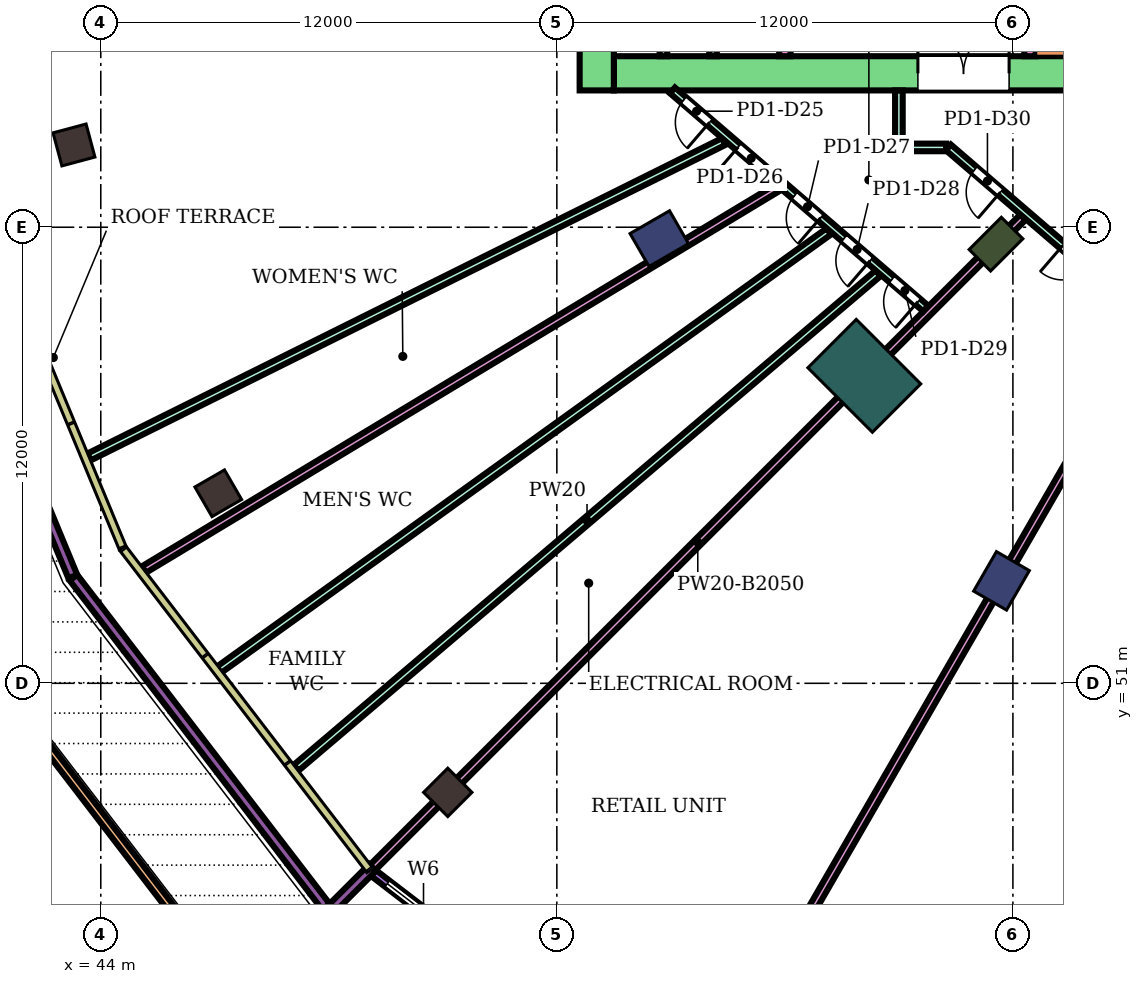
"""IFC4 building model, lengths in metres.
Left out: names, types, materials, properties, quantities, classifications, styles, units other than length and angle.
Written with IfcOpenShell. Run it as: python <this file> out.ifc"""

import sys

from ifc_helpers import new_model, si_unit, direction, frame, frame_2d, origin, origin_2d, place, context, subcontext, project, spatial, rectangle, extrude, element, fill, save


model = new_model("IFC4")
c1 = context("Model", 3, precision=1e-05, world=origin(), true_north=direction((0.0, 1.0)))
c2 = subcontext(c1, "Body", "Model", "MODEL_VIEW")
j1 = project(units=[si_unit("LENGTHUNIT", "METRE"), si_unit("PLANEANGLEUNIT", "RADIAN")], contexts=[c1])
p1 = place(None, origin())
s1 = spatial("IfcSite", under=j1, at=p1, CompositionType="ELEMENT")
p2 = place(p1, origin())
s2 = spatial("IfcBuilding", under=s1, at=p2, CompositionType="ELEMENT")
p3 = place(p2, frame((0.0, 0.0, 7.0)))
s3 = spatial("IfcBuildingStorey", under=s2, at=p3, CompositionType="ELEMENT", Elevation=7.0)
for number, where, z_axis, x_axis in (
    (1, (43.295, 65.165, 0.0), (0.0, 0.0, 1.0), (-0.966, -0.259, 0.0)),
    (2, (47.091, 56.0, 0.0), (0.0, 0.0, 1.0), (-0.866, -0.5, 0.0)),
    (3, (53.13, 48.13, 0.0), (0.0, 0.0, 1.0), (-0.707, -0.707, 0.0)),
):
    element("IfcColumn", number, at=place(p3, frame(where, z_axis=z_axis, x_axis=x_axis)), inside=s3, PredefinedType="COLUMN", context=c2, shape_type="SweptSolid", body=[
        extrude(rectangle(XDim=0.9, YDim=0.9, at=origin_2d()), origin(), (0.0, 0.0, 1.0), 5.4),
    ])
for number, where, z_axis, x_axis in (
    (4, (58.696, 62.7, 0.0), (0.0, 0.0, 1.0), (-0.866, -0.5, 0.0)),
    (5, (67.7, 53.696, 0.0), (0.0, 0.0, 1.0), (-0.5, -0.866, 0.0)),
):
    element("IfcColumn", number, at=place(p3, frame(where, z_axis=z_axis, x_axis=x_axis)), inside=s3, PredefinedType="COLUMN", context=c2, shape_type="SweptSolid", body=[
        extrude(rectangle(XDim=1.2, YDim=1.0, at=origin_2d()), origin(), (0.0, 0.0, 1.0), 5.4),
    ])
p4 = place(p3, frame((67.555, 62.555, 0.0), z_axis=(0.0, 0.0, 1.0), x_axis=(-0.707106781187, -0.707106781187, 0.0)))
e6 = element("IfcColumn", 6, at=p4, inside=s3, PredefinedType="COLUMN", context=c2, shape_type="SweptSolid", body=[
    extrude(rectangle(XDim=1.2, YDim=0.8, at=origin_2d()), origin(), (0.0, 0.0, 1.0), 5.4),
])
p5 = place(p3, frame((64.09, 59.09, 0.0), z_axis=(0.0, 0.0, 1.0), x_axis=(-0.707106781187, -0.707106781187, 0.0)))
e7 = element("IfcColumn", 7, at=p5, inside=s3, PredefinedType="COLUMN", context=c2, shape_type="SweptSolid", body=[
    extrude(rectangle(XDim=1.8, YDim=2.4, at=origin_2d()), origin(), (0.0, 0.0, 1.0), 5.4),
])
p6 = place(p3, frame((72.1, 67.05, 0.0), z_axis=(0.0, 0.0, 1.0), x_axis=(-1.0, 0.0, 0.0)))
e8 = element("IfcWall", 8, at=p6, inside=s3, PredefinedType="SHEAR", context=c2, shape_type="SweptSolid", body=[
    extrude(rectangle(XDim=14.6, YDim=0.9, at=frame_2d((7.3, 0.0))), origin(), (0.0, 0.0, 1.0), 4.95),
])
p7 = place(p6, frame((4.2, 0.0, 0.0)))
e9 = element("IfcOpeningElement", 9, at=p7, cuts=e8, PredefinedType="OPENING", context=c2, shape_type="SweptSolid", body=[
    extrude(rectangle(XDim=2.4, YDim=2.4, at=frame_2d((1.2, 1.2))), frame((0.0, 0.46, 0.0), z_axis=(0.0, -1.0, 0.0), x_axis=(1.0, 0.0, 0.0)), (0.0, 0.0, 1.0), 0.92),
])
p8 = place(p3, frame((57.05, 83.4, 0.0), z_axis=(0.0, 0.0, 1.0), x_axis=(0.0, -1.0, 0.0)))
e10 = element("IfcWall", 10, at=p8, inside=s3, PredefinedType="SHEAR", context=c2, shape_type="SweptSolid", body=[
    extrude(rectangle(XDim=16.8, YDim=0.9, at=frame_2d((8.4, 0.0))), origin(), (0.0, 0.0, 1.0), 4.95),
])
p9 = place(p3, frame((68.45, 75.0, 0.0), z_axis=(0.0, 0.0, 1.0), x_axis=(0.0, -1.0, 0.0)))
e11 = element("IfcWall", 11, at=p9, inside=s3, PredefinedType="SHEAR", context=c2, shape_type="SweptSolid", body=[
    extrude(rectangle(XDim=7.5, YDim=0.3, at=frame_2d((3.75, 0.0))), origin(), (0.0, 0.0, 1.0), 4.95),
])
p10 = place(p9, frame((1.85, 0.0, 0.0)))
e12 = element("IfcOpeningElement", 12, at=p10, cuts=e11, PredefinedType="OPENING", context=c2, shape_type="SweptSolid", body=[
    extrude(rectangle(XDim=0.9, YDim=2.1, at=frame_2d((0.45, 1.05))), frame((0.0, 0.16, 0.0), z_axis=(0.0, -1.0, 0.0), x_axis=(1.0, 0.0, 0.0)), (0.0, 0.0, 1.0), 0.32),
])
p11 = place(p3, frame((62.0, 71.4, 0.0), z_axis=(0.0, 0.0, 1.0), x_axis=(0.0, -1.0, 0.0)))
e13 = element("IfcWall", 13, at=p11, inside=s3, PredefinedType="SHEAR", context=c2, shape_type="SweptSolid", body=[
    extrude(rectangle(XDim=3.9, YDim=0.3, at=frame_2d((1.95, 0.0))), origin(), (0.0, 0.0, 1.0), 4.95),
])
p12 = place(p3, frame((51.08, 46.08, 0.0), z_axis=(0.0, 0.0, 1.0), x_axis=(0.793366340284, -0.608744486714, 0.0)))
e14 = element("IfcWall", 14, at=p12, inside=s3, PredefinedType="NOTDEFINED", context=c2, shape_type="SweptSolid", body=[
    extrude(rectangle(XDim=10.677, YDim=0.2, at=frame_2d((5.338, 0.0))), origin(), (0.0, 0.0, 1.0), 5.4),
])
p13 = place(p12, frame((0.58, 0.0, 0.9)))
e15 = element("IfcOpeningElement", 15, at=p13, cuts=e14, PredefinedType="OPENING", context=c2, shape_type="SweptSolid", body=[
    extrude(rectangle(XDim=2.4, YDim=2.4, at=frame_2d((1.2, 1.2))), frame((0.0, 0.11, 0.0), z_axis=(0.0, -1.0, 0.0), x_axis=(1.0, 0.0, 0.0)), (0.0, 0.0, 1.0), 0.22),
])
p14 = place(p12, frame((4.438, 0.0, 0.0)))
e16 = element("IfcOpeningElement", 16, at=p14, cuts=e14, PredefinedType="OPENING", context=c2, shape_type="SweptSolid", body=[
    extrude(rectangle(XDim=1.8, YDim=2.4, at=frame_2d((0.9, 1.2))), frame((0.0, 0.11, 0.0), z_axis=(0.0, -1.0, 0.0), x_axis=(1.0, 0.0, 0.0)), (0.0, 0.0, 1.0), 0.22),
])
p15 = place(p12, frame((7.697, 0.0, 0.9)))
e17 = element("IfcOpeningElement", 17, at=p15, cuts=e14, PredefinedType="OPENING", context=c2, shape_type="SweptSolid", body=[
    extrude(rectangle(XDim=2.4, YDim=2.4, at=frame_2d((1.2, 1.2))), frame((0.0, 0.11, 0.0), z_axis=(0.0, -1.0, 0.0), x_axis=(1.0, 0.0, 0.0)), (0.0, 0.0, 1.0), 0.22),
])
p16 = place(p3, frame((47.679, 42.698, 0.0), z_axis=(0.0, 0.0, 1.0), x_axis=(-0.608758745152, 0.79335539968, 0.0)))
e18 = element("IfcWall", 18, at=p16, inside=s3, PredefinedType="PARAPET", context=c2, shape_type="SweptSolid", body=[
    extrude(rectangle(XDim=11.903, YDim=0.2, at=frame_2d((5.952, 0.0))), origin(), (0.0, 0.0, 1.0), 1.1),
])
p17 = place(p3, frame((51.151, 46.151, 0.0), z_axis=(0.0, 0.0, 1.0), x_axis=(-0.707106781187, -0.707106781187, 0.0)))
e19 = element("IfcWall", 19, at=p17, inside=s3, PredefinedType="USERDEFINED", context=c2, shape_type="SweptSolid", body=[
    extrude(rectangle(XDim=1.471, YDim=0.25, at=frame_2d((0.736, 0.0))), origin(), (0.0, 0.0, 1.0), 0.6),
])
p18 = place(p3, frame((49.923, 45.123, 0.0), z_axis=(0.0, 0.0, 1.0), x_axis=(-0.608762138024, 0.793352796244, 0.0)))
e20 = element("IfcWall", 20, at=p18, inside=s3, PredefinedType="USERDEFINED", context=c2, shape_type="SweptSolid", body=[
    extrude(rectangle(XDim=10.913, YDim=0.25, at=frame_2d((5.457, 0.0))), origin(), (0.0, 0.0, 1.0), 0.6),
])
p19 = place(p3, frame((43.264, 53.809, 0.0), z_axis=(0.0, 0.0, 1.0), x_axis=(-0.382683446042, 0.923879526846, 0.0)))
e21 = element("IfcWall", 21, at=p19, inside=s3, PredefinedType="USERDEFINED", context=c2, shape_type="SweptSolid", body=[
    extrude(rectangle(XDim=4.919, YDim=0.25, at=frame_2d((2.46, 0.0))), origin(), (0.0, 0.0, 1.0), 0.6),
])
p20 = place(p3, frame((43.693, 56.956, 0.0), z_axis=(0.0, 0.0, 1.0), x_axis=(0.895500820316, 0.445059862056, 0.0)))
e22 = element("IfcWall", 22, at=p20, inside=s3, PredefinedType="PARTITIONING", context=c2, shape_type="SweptSolid", body=[
    extrude(rectangle(XDim=18.647, YDim=0.2, at=frame_2d((9.323, 0.0))), origin(), (0.0, 0.0, 1.0), 4.95),
])
p21 = place(p3, frame((45.134, 53.993, 0.0), z_axis=(0.0, 0.0, 1.0), x_axis=(0.856552604293, 0.516059721427, 0.0)))
e23 = element("IfcWall", 23, at=p21, inside=s3, PredefinedType="PARTITIONING", context=c2, shape_type="SweptSolid", body=[
    extrude(rectangle(XDim=19.479, YDim=0.2, at=frame_2d((9.74, 0.0))), origin(), (0.0, 0.0, 1.0), 3.35),
])
p22 = place(p3, frame((47.092, 51.343, 0.0), z_axis=(0.0, 0.0, 1.0), x_axis=(0.811971325551, 0.583697324375, 0.0)))
e24 = element("IfcWall", 24, at=p22, inside=s3, PredefinedType="PARTITIONING", context=c2, shape_type="SweptSolid", body=[
    extrude(rectangle(XDim=19.785, YDim=0.2, at=frame_2d((9.893, 0.0))), origin(), (0.0, 0.0, 1.0), 4.95),
])
p23 = place(p3, frame((49.138, 48.776, 0.0), z_axis=(0.0, 0.0, 1.0), x_axis=(0.762040332495, 0.647529560445, 0.0)))
e25 = element("IfcWall", 25, at=p23, inside=s3, PredefinedType="PARTITIONING", context=c2, shape_type="SweptSolid", body=[
    extrude(rectangle(XDim=20.094, YDim=0.2, at=frame_2d((10.047, 0.0))), origin(), (0.0, 0.0, 1.0), 4.95),
])
p24 = place(p3, frame((51.152, 46.152, 0.0), z_axis=(0.0, 0.0, 1.0), x_axis=(0.707101737431, 0.707111824906, 0.0)))
e26 = element("IfcWall", 26, at=p24, inside=s3, PredefinedType="PARTITIONING", context=c2, shape_type="SweptSolid", body=[
    extrude(rectangle(XDim=24.202, YDim=0.2, at=frame_2d((12.101, 0.0))), origin(), (0.0, 0.0, 1.0), 3.35),
])
p25 = place(p3, frame((59.042, 66.601, 0.0), z_axis=(0.0, 0.0, 1.0), x_axis=(0.757804642565, -0.652481512157, 0.0)))
e27 = element("IfcWall", 27, at=p25, inside=s3, PredefinedType="PARTITIONING", context=c2, shape_type="SweptSolid", body=[
    extrude(rectangle(XDim=8.794, YDim=0.2, at=frame_2d((4.397, 0.0))), origin(), (0.0, 0.0, 1.0), 4.95),
])
p26 = place(p25, frame((0.389, 0.0, 0.0)))
e28 = element("IfcOpeningElement", 28, at=p26, cuts=e27, PredefinedType="OPENING", context=c2, shape_type="SweptSolid", body=[
    extrude(rectangle(XDim=0.9, YDim=2.1, at=frame_2d((0.45, 1.05))), frame((0.0, 0.11, 0.0), z_axis=(0.0, -1.0, 0.0), x_axis=(1.0, 0.0, 0.0)), (0.0, 0.0, 1.0), 0.22),
])
p27 = place(p25, frame((2.285, 0.0, 0.0)))
e29 = element("IfcOpeningElement", 29, at=p27, cuts=e27, PredefinedType="OPENING", context=c2, shape_type="SweptSolid", body=[
    extrude(rectangle(XDim=0.9, YDim=2.1, at=frame_2d((0.45, 1.05))), frame((0.0, 0.11, 0.0), z_axis=(0.0, -1.0, 0.0), x_axis=(1.0, 0.0, 0.0)), (0.0, 0.0, 1.0), 0.22),
])
p28 = place(p25, frame((4.24, 0.0, 0.0)))
e30 = element("IfcOpeningElement", 30, at=p28, cuts=e27, PredefinedType="OPENING", context=c2, shape_type="SweptSolid", body=[
    extrude(rectangle(XDim=0.9, YDim=2.1, at=frame_2d((0.45, 1.05))), frame((0.0, 0.11, 0.0), z_axis=(0.0, -1.0, 0.0), x_axis=(1.0, 0.0, 0.0)), (0.0, 0.0, 1.0), 0.22),
])
p29 = place(p25, frame((5.963, 0.0, 0.0)))
e31 = element("IfcOpeningElement", 31, at=p29, cuts=e27, PredefinedType="OPENING", context=c2, shape_type="SweptSolid", body=[
    extrude(rectangle(XDim=0.9, YDim=2.1, at=frame_2d((0.45, 1.05))), frame((0.0, 0.11, 0.0), z_axis=(0.0, -1.0, 0.0), x_axis=(1.0, 0.0, 0.0)), (0.0, 0.0, 1.0), 0.22),
])
p30 = place(p25, frame((7.622, 0.0, 0.0)))
e32 = element("IfcOpeningElement", 32, at=p30, cuts=e27, PredefinedType="OPENING", context=c2, shape_type="SweptSolid", body=[
    extrude(rectangle(XDim=0.9, YDim=2.1, at=frame_2d((0.45, 1.05))), frame((0.0, 0.11, 0.0), z_axis=(0.0, -1.0, 0.0), x_axis=(1.0, 0.0, 0.0)), (0.0, 0.0, 1.0), 0.22),
])
p31 = place(p3, frame((59.6, 39.669, 0.0), z_axis=(0.0, 0.0, 1.0), x_axis=(0.500039717933, 0.866002471411, 0.0)))
e33 = element("IfcWall", 33, at=p31, inside=s3, PredefinedType="PARTITIONING", context=c2, shape_type="SweptSolid", body=[
    extrude(rectangle(XDim=23.958, YDim=0.2, at=frame_2d((11.979, 0.0))), origin(), (0.0, 0.0, 1.0), 3.35),
])
p32 = place(p3, frame((65.0, 65.2, 0.0), z_axis=(0.0, 0.0, 1.0), x_axis=(0.0, 1.0, 0.0)))
e34 = element("IfcWall", 34, at=p32, inside=s3, PredefinedType="PARTITIONING", context=c2, shape_type="SweptSolid", body=[
    extrude(rectangle(XDim=1.399, YDim=0.2, at=frame_2d((0.7, 0.0))), origin(), (0.0, 0.0, 1.0), 4.95),
])
p33 = place(p3, frame((65.0, 65.1, 0.0), z_axis=(0.0, 0.0, 1.0), x_axis=(1.0, 0.0, 0.0)))
e35 = element("IfcWall", 35, at=p33, inside=s3, PredefinedType="PARTITIONING", context=c2, shape_type="SweptSolid", body=[
    extrude(rectangle(XDim=1.242, YDim=0.2, at=frame_2d((0.621, 0.0))), origin(), (0.0, 0.0, 1.0), 4.95),
])
p34 = place(p3, frame((66.302, 65.1, 0.0), z_axis=(0.0, 0.0, 1.0), x_axis=(0.757895579626, -0.652375881209, 0.0)))
e36 = element("IfcWall", 36, at=p34, inside=s3, PredefinedType="PARTITIONING", context=c2, shape_type="SweptSolid", body=[
    extrude(rectangle(XDim=7.062, YDim=0.2, at=frame_2d((3.531, 0.0))), origin(), (0.0, 0.0, 1.0), 4.95),
])
p35 = place(p34, frame((3.964, 0.0, 0.0)))
e37 = element("IfcOpeningElement", 37, at=p35, cuts=e36, PredefinedType="OPENING", context=c2, shape_type="SweptSolid", body=[
    extrude(rectangle(XDim=1.8, YDim=2.1, at=frame_2d((0.9, 1.05))), frame((0.0, 0.11, 0.0), z_axis=(0.0, -1.0, 0.0), x_axis=(1.0, 0.0, 0.0)), (0.0, 0.0, 1.0), 0.22),
])
p36 = place(p34, frame((0.906, 0.0, 0.0)))
e38 = element("IfcOpeningElement", 38, at=p36, cuts=e36, PredefinedType="OPENING", context=c2, shape_type="SweptSolid", body=[
    extrude(rectangle(XDim=0.9, YDim=2.1, at=frame_2d((0.45, 1.05))), frame((0.0, 0.11, 0.0), z_axis=(0.0, -1.0, 0.0), x_axis=(1.0, 0.0, 0.0)), (0.0, 0.0, 1.0), 0.22),
])
for number, where, z_axis, x_axis in (
    (39, (60.11, 71.1, 0.0), (0.0, 0.0, 1.0), (0.0, -1.0, 0.0)),
    (40, (58.805, 71.1, 0.0), (0.0, 0.0, 1.0), (0.0, -1.0, 0.0)),
):
    element("IfcWall", number, at=place(p3, frame(where, z_axis=z_axis, x_axis=x_axis)), inside=s3, PredefinedType="PARTITIONING", context=c2, shape_type="SweptSolid", body=[
        extrude(rectangle(XDim=3.6, YDim=0.2, at=frame_2d((1.8, 0.0))), origin(), (0.0, 0.0, 1.0), 4.95),
    ])
p37 = place(p13, origin())
e41 = element("IfcWindow", 41, at=p37, inside=s3, PartitioningType="SINGLE_PANEL", PredefinedType="WINDOW", context=c2, shape_type="SweptSolid", body=[
    extrude(rectangle(XDim=2.4, YDim=2.4, at=frame_2d((1.2, 1.2))), frame((0.0, 0.03, 0.0), z_axis=(0.0, -1.0, 0.0), x_axis=(1.0, 0.0, 0.0)), (0.0, 0.0, 1.0), 0.06),
])
fill(e15, e41)
p38 = place(p35, frame((1.8, 0.0, 0.0), z_axis=(0.0, 0.0, 1.0), x_axis=(-1.0, 0.0, 0.0)))
e42 = element("IfcDoor", 42, at=p38, inside=s3, OperationType="DOUBLE_DOOR_SINGLE_SWING", PredefinedType="DOOR", context=c2, shape_type="SweptSolid", body=[
    extrude(rectangle(XDim=1.8, YDim=2.1, at=frame_2d((0.9, 1.05))), frame((0.0, 0.025, 0.0), z_axis=(0.0, -1.0, 0.0), x_axis=(1.0, 0.0, 0.0)), (0.0, 0.0, 1.0), 0.05),
])
fill(e37, e42)
p39 = place(p26, frame((0.9, 0.0, 0.0), z_axis=(0.0, 0.0, 1.0), x_axis=(-1.0, 0.0, 0.0)))
e43 = element("IfcDoor", 43, at=p39, inside=s3, OperationType="SINGLE_SWING_LEFT", PredefinedType="DOOR", context=c2, shape_type="SweptSolid", body=[
    extrude(rectangle(XDim=0.9, YDim=2.1, at=frame_2d((0.45, 1.05))), frame((0.0, 0.025, 0.0), z_axis=(0.0, -1.0, 0.0), x_axis=(1.0, 0.0, 0.0)), (0.0, 0.0, 1.0), 0.05),
])
fill(e28, e43)
p40 = place(p27, frame((0.9, 0.0, 0.0), z_axis=(0.0, 0.0, 1.0), x_axis=(-1.0, 0.0, 0.0)))
e44 = element("IfcDoor", 44, at=p40, inside=s3, OperationType="SINGLE_SWING_RIGHT", PredefinedType="DOOR", context=c2, shape_type="SweptSolid", body=[
    extrude(rectangle(XDim=0.9, YDim=2.1, at=frame_2d((0.45, 1.05))), frame((0.0, 0.025, 0.0), z_axis=(0.0, -1.0, 0.0), x_axis=(1.0, 0.0, 0.0)), (0.0, 0.0, 1.0), 0.05),
])
fill(e29, e44)
p41 = place(p28, frame((0.9, 0.0, 0.0), z_axis=(0.0, 0.0, 1.0), x_axis=(-1.0, 0.0, 0.0)))
e45 = element("IfcDoor", 45, at=p41, inside=s3, OperationType="SINGLE_SWING_LEFT", PredefinedType="DOOR", context=c2, shape_type="SweptSolid", body=[
    extrude(rectangle(XDim=0.9, YDim=2.1, at=frame_2d((0.45, 1.05))), frame((0.0, 0.025, 0.0), z_axis=(0.0, -1.0, 0.0), x_axis=(1.0, 0.0, 0.0)), (0.0, 0.0, 1.0), 0.05),
])
fill(e30, e45)
p42 = place(p29, frame((0.9, 0.0, 0.0), z_axis=(0.0, 0.0, 1.0), x_axis=(-1.0, 0.0, 0.0)))
e46 = element("IfcDoor", 46, at=p42, inside=s3, OperationType="SINGLE_SWING_LEFT", PredefinedType="DOOR", context=c2, shape_type="SweptSolid", body=[
    extrude(rectangle(XDim=0.9, YDim=2.1, at=frame_2d((0.45, 1.05))), frame((0.0, 0.025, 0.0), z_axis=(0.0, -1.0, 0.0), x_axis=(1.0, 0.0, 0.0)), (0.0, 0.0, 1.0), 0.05),
])
fill(e31, e46)
p43 = place(p30, frame((0.9, 0.0, 0.0), z_axis=(0.0, 0.0, 1.0), x_axis=(-1.0, 0.0, 0.0)))
e47 = element("IfcDoor", 47, at=p43, inside=s3, OperationType="SINGLE_SWING_LEFT", PredefinedType="DOOR", context=c2, shape_type="SweptSolid", body=[
    extrude(rectangle(XDim=0.9, YDim=2.1, at=frame_2d((0.45, 1.05))), frame((0.0, 0.025, 0.0), z_axis=(0.0, -1.0, 0.0), x_axis=(1.0, 0.0, 0.0)), (0.0, 0.0, 1.0), 0.05),
])
fill(e32, e47)
p44 = place(p36, frame((0.9, 0.0, 0.0), z_axis=(0.0, 0.0, 1.0), x_axis=(-1.0, 0.0, 0.0)))
e48 = element("IfcDoor", 48, at=p44, inside=s3, OperationType="SINGLE_SWING_LEFT", PredefinedType="DOOR", context=c2, shape_type="SweptSolid", body=[
    extrude(rectangle(XDim=0.9, YDim=2.1, at=frame_2d((0.45, 1.05))), frame((0.0, 0.025, 0.0), z_axis=(0.0, -1.0, 0.0), x_axis=(1.0, 0.0, 0.0)), (0.0, 0.0, 1.0), 0.05),
])
fill(e38, e48)
p45 = place(p7, frame((2.4, 0.0, 0.0), z_axis=(0.0, 0.0, 1.0), x_axis=(-1.0, 0.0, 0.0)))
e49 = element("IfcDoor", 49, at=p45, inside=s3, OperationType="DOUBLE_DOOR_SINGLE_SWING", PredefinedType="DOOR", context=c2, shape_type="SweptSolid", body=[
    extrude(rectangle(XDim=2.4, YDim=2.4, at=frame_2d((1.2, 1.2))), frame((0.0, 0.025, 0.0), z_axis=(0.0, -1.0, 0.0), x_axis=(1.0, 0.0, 0.0)), (0.0, 0.0, 1.0), 0.05),
])
fill(e9, e49)
save(model, sys.argv[1])
